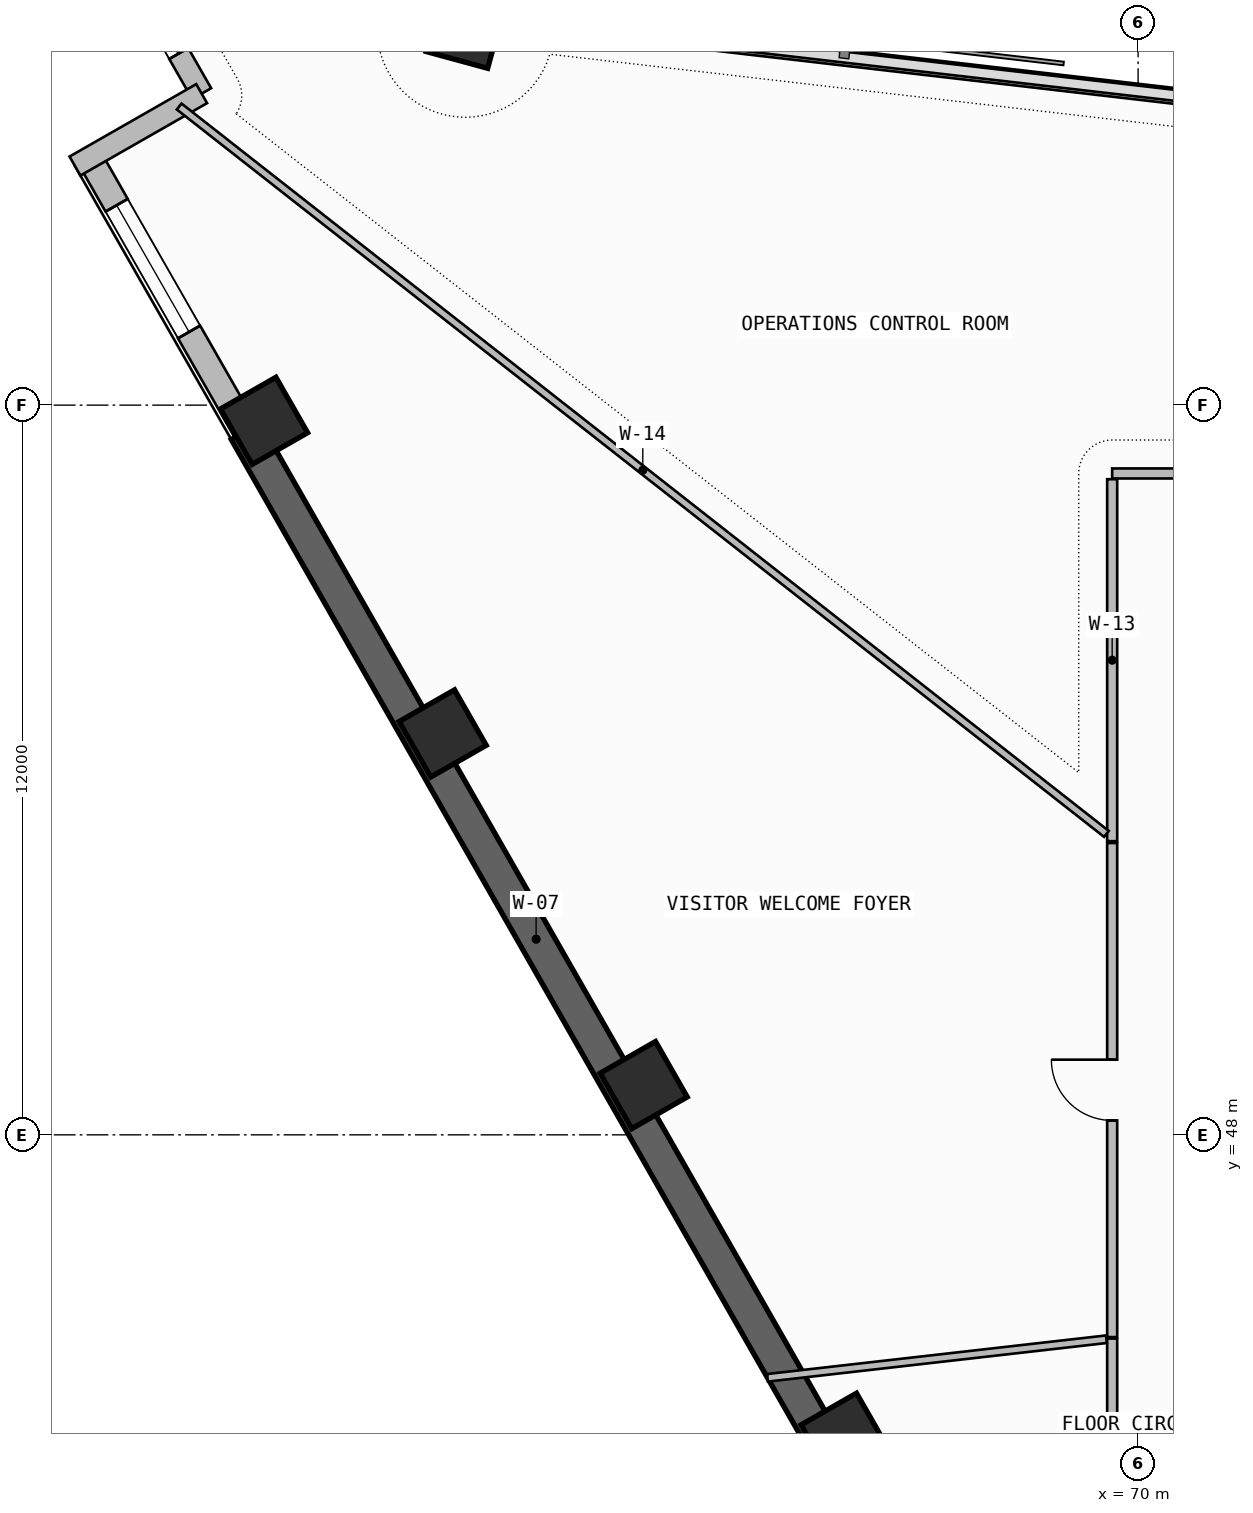
"""IFC4 building model, lengths in metres.
Left out: names, types, materials, properties, quantities, classifications, styles, units other than length and angle.
Written with IfcOpenShell. Run it as: python <this file> out.ifc"""

import sys

from ifc_helpers import new_model, si_unit, direction, frame, frame_2d, origin, origin_2d, place, context, subcontext, project, spatial, rectangle, extrude, element, fill, save


model = new_model("IFC4")
c1 = context("Model", 3, precision=1e-05, world=origin(), true_north=direction((0.0, 1.0)))
c2 = subcontext(c1, "Body", "Model", "MODEL_VIEW")
j1 = project(units=[si_unit("LENGTHUNIT", "METRE"), si_unit("PLANEANGLEUNIT", "RADIAN")], contexts=[c1])
p1 = place(None, origin())
s1 = spatial("IfcSite", under=j1, at=p1, CompositionType="ELEMENT")
p2 = place(p1, origin())
s2 = spatial("IfcBuilding", under=s1, at=p2, CompositionType="ELEMENT")
p3 = place(p2, frame((0.0, 0.0, 229.06)))
s3 = spatial("IfcBuildingStorey", under=s2, at=p3, CompositionType="ELEMENT", Elevation=229.06)
for number, where, z_axis, x_axis in (
    (1, (58.934, 66.184, 0.0), (0.0, 0.0, 1.0), (0.263, 0.965, 0.0)),
    (2, (55.625, 59.742, 0.0), (0.0, 0.0, 1.0), (-0.496, 0.868, 0.0)),
    (3, (58.563, 54.601, 0.0), (0.0, 0.0, 1.0), (-0.496, 0.868, 0.0)),
    (4, (61.868, 48.818, 0.0), (0.0, 0.0, 1.0), (-0.496, 0.868, 0.0)),
    (5, (65.173, 43.035, 0.0), (0.0, 0.0, 1.0), (-0.496, 0.868, 0.0)),
):
    element("IfcColumn", number, at=place(p3, frame(where, z_axis=z_axis, x_axis=x_axis)), inside=s3, PredefinedType="COLUMN", context=c2, shape_type="SweptSolid", body=[
        extrude(rectangle(XDim=1.05, YDim=1.05, at=origin_2d()), origin(), (0.0, 0.0, 1.0), 3.52),
    ])
p4 = place(p3, frame((52.754, 64.068, 0.0), z_axis=(0.0, 0.0, 1.0), x_axis=(0.496209984367, -0.868202540548, 0.0)))
e6 = element("IfcWall", 6, at=p4, inside=s3, PredefinedType="SOLIDWALL", context=c2, shape_type="SweptSolid", body=[
    extrude(rectangle(XDim=5.181, YDim=0.42, at=frame_2d((2.59, 0.0))), origin(), (0.0, 0.0, 1.0), 2.237),
])
p5 = place(p4, frame((0.9, 0.0, 0.957)))
e7 = element("IfcOpeningElement", 7, at=p5, cuts=e6, PredefinedType="OPENING", context=c2, shape_type="SweptSolid", body=[
    extrude(rectangle(XDim=2.4, YDim=1.2, at=frame_2d((1.2, 0.6))), frame((0.0, 0.22, 0.0), z_axis=(0.0, -1.0, 0.0), x_axis=(1.0, 0.0, 0.0)), (0.0, 0.0, 1.0), 0.44),
])
p6 = place(p3, frame((55.325, 59.57, -0.26), z_axis=(0.0, 0.0, 1.0), x_axis=(0.496211351597, -0.868201759124, 0.0)))
e8 = element("IfcWall", 8, at=p6, inside=s3, PredefinedType="SHEAR", context=c2, shape_type="SweptSolid", body=[
    extrude(rectangle(XDim=19.243, YDim=0.55, at=frame_2d((9.622, 0.0))), origin(), (0.0, 0.0, 1.0), 3.52),
])
p7 = place(p3, frame((53.408, 67.206, 0.0), z_axis=(0.0, 0.0, 1.0), x_axis=(0.496292324652, -0.868155474838, 0.0)))
e9 = element("IfcWall", 9, at=p7, inside=s3, PredefinedType="SOLIDWALL", context=c2, shape_type="SweptSolid", body=[
    extrude(rectangle(XDim=2.4, YDim=0.36, at=frame_2d((1.2, 0.0))), origin(), (0.0, 0.0, 1.0), 3.26),
])
p8 = place(p7, frame((0.34, 0.0, 0.45)))
e10 = element("IfcOpeningElement", 10, at=p8, cuts=e9, PredefinedType="OPENING", context=c2, shape_type="SweptSolid", body=[
    extrude(rectangle(XDim=1.3, YDim=2.4, at=frame_2d((0.65, 1.2))), frame((0.0, 0.19, 0.0), z_axis=(0.0, -1.0, 0.0), x_axis=(1.0, 0.0, 0.0)), (0.0, 0.0, 1.0), 0.38),
])
p9 = place(p3, frame((54.599, 65.123, 0.0), z_axis=(0.0, 0.0, 1.0), x_axis=(-0.86818053093, -0.4962484919, 0.0)))
e11 = element("IfcWall", 11, at=p9, inside=s3, PredefinedType="SOLIDWALL", context=c2, shape_type="SweptSolid", body=[
    extrude(rectangle(XDim=2.4, YDim=0.36, at=frame_2d((1.2, 0.0))), origin(), (0.0, 0.0, 1.0), 3.26),
])
p10 = place(p3, frame((85.424, 63.338, 0.0), z_axis=(0.0, 0.0, 1.0), x_axis=(-0.993364714048, 0.115006716693, 0.0)))
e12 = element("IfcWall", 12, at=p10, inside=s3, PredefinedType="PARAPET", context=c2, shape_type="SweptSolid", body=[
    extrude(rectangle(XDim=26.302, YDim=0.2, at=frame_2d((13.151, 0.0))), origin(), (0.0, 0.0, 1.0), 1.15),
])
p11 = place(p3, frame((69.573, 44.65, 0.0), z_axis=(0.0, 0.0, 1.0), x_axis=(0.0, -1.0, 0.0)))
e13 = element("IfcWall", 13, at=p11, inside=s3, PredefinedType="PARTITIONING", context=c2, shape_type="SweptSolid", body=[
    extrude(rectangle(XDim=7.238, YDim=0.165, at=frame_2d((3.619, 0.0))), origin(), (0.0, 0.0, 1.0), 3.26),
])
p12 = place(p11, frame((3.119, 0.0, 0.0)))
e14 = element("IfcOpeningElement", 14, at=p12, cuts=e13, PredefinedType="OPENING", context=c2, shape_type="SweptSolid", body=[
    extrude(rectangle(XDim=1.0, YDim=2.2, at=frame_2d((0.5, 1.1))), frame((0.0, 0.093, 0.0), z_axis=(0.0, -1.0, 0.0), x_axis=(1.0, 0.0, 0.0)), (0.0, 0.0, 1.0), 0.185),
])
p13 = place(p3, frame((63.905, 44.004, 0.0), z_axis=(0.0, 0.0, 1.0), x_axis=(0.993582932181, 0.113105954217, 0.0)))
e15 = element("IfcWall", 15, at=p13, inside=s3, PredefinedType="PARTITIONING", context=c2, shape_type="SweptSolid", body=[
    extrude(rectangle(XDim=5.61, YDim=0.125, at=frame_2d((2.805, 0.0))), origin(), (0.0, 0.0, 1.0), 2.237),
])
p14 = place(p3, frame((77.35, 58.876, 0.0), z_axis=(0.0, 0.0, 1.0), x_axis=(-1.0, 0.0, 0.0)))
e16 = element("IfcWall", 16, at=p14, inside=s3, PredefinedType="PARTITIONING", context=c2, shape_type="SweptSolid", body=[
    extrude(rectangle(XDim=7.777, YDim=0.165, at=frame_2d((3.888, 0.0))), origin(), (0.0, 0.0, 1.0), 3.26),
])
p15 = place(p14, frame((1.603, 0.0, 0.0)))
e17 = element("IfcOpeningElement", 17, at=p15, cuts=e16, PredefinedType="OPENING", context=c2, shape_type="SweptSolid", body=[
    extrude(rectangle(XDim=1.0, YDim=2.2, at=frame_2d((0.5, 1.1))), frame((0.0, 0.093, 0.0), z_axis=(0.0, -1.0, 0.0), x_axis=(1.0, 0.0, 0.0)), (0.0, 0.0, 1.0), 0.185),
])
p16 = place(p3, frame((69.573, 58.782, 0.0), z_axis=(0.0, 0.0, 1.0), x_axis=(0.0, -1.0, 0.0)))
e18 = element("IfcWall", 18, at=p16, inside=s3, PredefinedType="PARTITIONING", context=c2, shape_type="SweptSolid", body=[
    extrude(rectangle(XDim=5.953, YDim=0.165, at=frame_2d((2.977, 0.0))), origin(), (0.0, 0.0, 1.0), 2.237),
])
p17 = place(p3, frame((69.479, 52.949, 0.0), z_axis=(0.0, 0.0, 1.0), x_axis=(-0.786818994279, 0.617183822084, 0.0)))
e19 = element("IfcWall", 19, at=p17, inside=s3, PredefinedType="PARTITIONING", context=c2, shape_type="SweptSolid", body=[
    extrude(rectangle(XDim=19.382, YDim=0.125, at=frame_2d((9.691, 0.0))), origin(), (0.0, 0.0, 1.0), 2.237),
])
p18 = place(p3, frame((69.573, 52.799, 0.0), z_axis=(0.0, 0.0, 1.0), x_axis=(0.0, -1.0, 0.0)))
e20 = element("IfcWall", 20, at=p18, inside=s3, PredefinedType="PARTITIONING", context=c2, shape_type="SweptSolid", body=[
    extrude(rectangle(XDim=8.125, YDim=0.165, at=frame_2d((4.062, 0.0))), origin(), (0.0, 0.0, 1.0), 2.237),
])
p19 = place(p18, frame((3.562, 0.0, 0.0)))
e21 = element("IfcOpeningElement", 21, at=p19, cuts=e20, PredefinedType="OPENING", context=c2, shape_type="SweptSolid", body=[
    extrude(rectangle(XDim=1.0, YDim=2.2, at=frame_2d((0.5, 1.1))), frame((0.0, 0.093, 0.0), z_axis=(0.0, -1.0, 0.0), x_axis=(1.0, 0.0, 0.0)), (0.0, 0.0, 1.0), 0.185),
])
p20 = place(p5, origin())
e22 = element("IfcWindow", 22, at=p20, inside=s3, PartitioningType="SINGLE_PANEL", PredefinedType="WINDOW", context=c2, shape_type="SweptSolid", body=[
    extrude(rectangle(XDim=2.4, YDim=1.2, at=frame_2d((1.2, 0.6))), frame((0.0, 0.03, 0.0), z_axis=(0.0, -1.0, 0.0), x_axis=(1.0, 0.0, 0.0)), (0.0, 0.0, 1.0), 0.06),
])
fill(e7, e22)
p21 = place(p8, origin())
e23 = element("IfcWindow", 23, at=p21, inside=s3, PartitioningType="SINGLE_PANEL", PredefinedType="WINDOW", context=c2, shape_type="SweptSolid", body=[
    extrude(rectangle(XDim=1.3, YDim=2.4, at=frame_2d((0.65, 1.2))), frame((0.0, 0.03, 0.0), z_axis=(0.0, -1.0, 0.0), x_axis=(1.0, 0.0, 0.0)), (0.0, 0.0, 1.0), 0.06),
])
fill(e10, e23)
p22 = place(p19, frame((1.0, 0.0, 0.0), z_axis=(0.0, 0.0, 1.0), x_axis=(-1.0, 0.0, 0.0)))
e24 = element("IfcDoor", 24, at=p22, inside=s3, OperationType="SINGLE_SWING_RIGHT", PredefinedType="DOOR", context=c2, shape_type="SweptSolid", body=[
    extrude(rectangle(XDim=1.0, YDim=2.2, at=frame_2d((0.5, 1.1))), frame((0.0, 0.025, 0.0), z_axis=(0.0, -1.0, 0.0), x_axis=(1.0, 0.0, 0.0)), (0.0, 0.0, 1.0), 0.05),
])
fill(e21, e24)
save(model, sys.argv[1])
